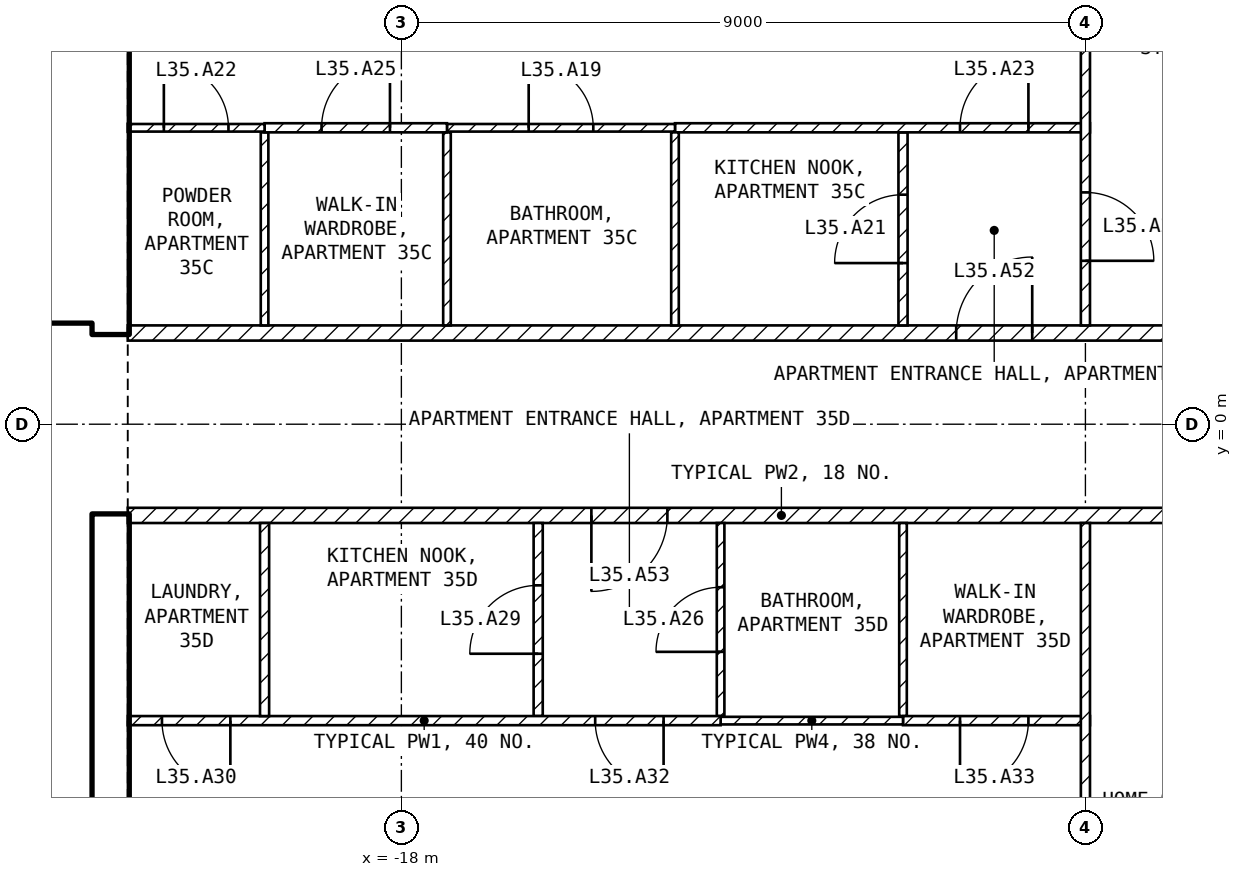
"""IFC4 building model, lengths in metres.
Left out: names, types, materials, properties, quantities, classifications, styles, units other than length and angle.
Written with IfcOpenShell. Run it as: python <this file> out.ifc"""

import sys

from ifc_helpers import new_model, si_unit, direction, frame, frame_2d, origin, place, context, subcontext, project, spatial, rectangle, extrude, element, fill, save


model = new_model("IFC4")
c1 = context("Model", 3, precision=1e-05, world=origin(), true_north=direction((0.0, 1.0)))
c2 = subcontext(c1, "Body", "Model", "MODEL_VIEW")
j1 = project(units=[si_unit("LENGTHUNIT", "METRE"), si_unit("PLANEANGLEUNIT", "RADIAN")], contexts=[c1])
p1 = place(None, origin())
s1 = spatial("IfcSite", under=j1, at=p1, CompositionType="ELEMENT")
p2 = place(p1, origin())
s2 = spatial("IfcBuilding", under=s1, at=p2, CompositionType="ELEMENT")
p3 = place(p2, frame((0.0, 0.0, 144.4)))
s3 = spatial("IfcBuildingStorey", under=s2, at=p3, CompositionType="ELEMENT", Elevation=144.4)
for number, where, z_axis, x_axis in (
    (1, (-21.825, -8.1, 0.0), (0.0, 0.0, 1.0), (0.0, 1.0, 0.0)),
    (2, (-21.825, 1.2, 0.0), (0.0, 0.0, 1.0), (0.0, 1.0, 0.0)),
):
    element("IfcWall", number, at=place(p3, frame(where, z_axis=z_axis, x_axis=x_axis)), inside=s3, PredefinedType="SHEAR", context=c2, shape_type="SweptSolid", body=[
        extrude(rectangle(XDim=6.9, YDim=0.45, at=frame_2d((3.45, 0.0))), origin(), (0.0, 0.0, 1.0), 3.25),
    ])
p4 = place(p3, frame((-33.05, 1.45, 0.0), z_axis=(0.0, 0.0, 1.0), x_axis=(1.0, 0.0, 0.0)))
e3 = element("IfcWall", 3, at=p4, inside=s3, PredefinedType="SOLIDWALL", context=c2, shape_type="SweptSolid", body=[
    extrude(rectangle(XDim=11.0, YDim=0.2, at=frame_2d((5.5, 0.0))), origin(), (0.0, 0.0, 1.0), 3.25),
])
p5 = place(p4, frame((9.25, 0.0, 0.0)))
e4 = element("IfcOpeningElement", 4, at=p5, cuts=e3, PredefinedType="OPENING", context=c2, shape_type="SweptSolid", body=[
    extrude(rectangle(XDim=1.0, YDim=2.1, at=frame_2d((0.5, 1.05))), frame((0.0, 0.11, 0.0), z_axis=(0.0, -1.0, 0.0), x_axis=(1.0, 0.0, 0.0)), (0.0, 0.0, 1.0), 0.22),
])
p6 = place(p4, frame((6.75, 0.0, 0.0)))
e5 = element("IfcOpeningElement", 5, at=p6, cuts=e3, PredefinedType="OPENING", context=c2, shape_type="SweptSolid", body=[
    extrude(rectangle(XDim=1.0, YDim=2.1, at=frame_2d((0.5, 1.05))), frame((0.0, 0.11, 0.0), z_axis=(0.0, -1.0, 0.0), x_axis=(1.0, 0.0, 0.0)), (0.0, 0.0, 1.0), 0.22),
])
p7 = place(p4, frame((1.025, 0.0, 0.0)))
e6 = element("IfcOpeningElement", 6, at=p7, cuts=e3, PredefinedType="OPENING", context=c2, shape_type="SweptSolid", body=[
    extrude(rectangle(XDim=0.9, YDim=2.1, at=frame_2d((0.45, 1.05))), frame((0.0, 0.11, 0.0), z_axis=(0.0, -1.0, 0.0), x_axis=(1.0, 0.0, 0.0)), (0.0, 0.0, 1.0), 0.22),
])
p8 = place(p3, frame((-21.6, 1.2, 0.0), z_axis=(0.0, 0.0, 1.0), x_axis=(1.0, 0.0, 0.0)))
e7 = element("IfcWall", 7, at=p8, inside=s3, PredefinedType="PARTITIONING", context=c2, shape_type="SweptSolid", body=[
    extrude(rectangle(XDim=17.2, YDim=0.2, at=frame_2d((8.6, 0.0))), origin(), (0.0, 0.0, 1.0), 3.25),
])
p9 = place(p8, frame((10.9, 0.0, 0.0)))
e8 = element("IfcOpeningElement", 8, at=p9, cuts=e7, PredefinedType="OPENING", context=c2, shape_type="SweptSolid", body=[
    extrude(rectangle(XDim=1.0, YDim=2.1, at=frame_2d((0.5, 1.05))), frame((0.0, 0.11, 0.0), z_axis=(0.0, -1.0, 0.0), x_axis=(1.0, 0.0, 0.0)), (0.0, 0.0, 1.0), 0.22),
])
p10 = place(p3, frame((-4.4, -1.2, 0.0), z_axis=(0.0, 0.0, 1.0), x_axis=(-1.0, 0.0, 0.0)))
e9 = element("IfcWall", 9, at=p10, inside=s3, PredefinedType="PARTITIONING", context=c2, shape_type="SweptSolid", body=[
    extrude(rectangle(XDim=17.2, YDim=0.2, at=frame_2d((8.6, 0.0))), origin(), (0.0, 0.0, 1.0), 3.25),
])
p11 = place(p10, frame((10.1, 0.0, 0.0)))
e10 = element("IfcOpeningElement", 10, at=p11, cuts=e9, PredefinedType="OPENING", context=c2, shape_type="SweptSolid", body=[
    extrude(rectangle(XDim=1.0, YDim=2.1, at=frame_2d((0.5, 1.05))), frame((0.0, 0.11, 0.0), z_axis=(0.0, -1.0, 0.0), x_axis=(1.0, 0.0, 0.0)), (0.0, 0.0, 1.0), 0.22),
])
p12 = place(p3, frame((-11.4, 1.3, 0.0), z_axis=(0.0, 0.0, 1.0), x_axis=(0.0, 1.0, 0.0)))
e11 = element("IfcWall", 11, at=p12, inside=s3, PredefinedType="PARTITIONING", context=c2, shape_type="SweptSolid", body=[
    extrude(rectangle(XDim=2.54, YDim=0.12, at=frame_2d((1.27, 0.0))), origin(), (0.0, 0.0, 1.0), 3.25),
])
p13 = place(p12, frame((0.82, 0.0, 0.0)))
e12 = element("IfcOpeningElement", 12, at=p13, cuts=e11, PredefinedType="OPENING", context=c2, shape_type="SweptSolid", body=[
    extrude(rectangle(XDim=0.9, YDim=2.1, at=frame_2d((0.45, 1.05))), frame((0.0, 0.07, 0.0), z_axis=(0.0, -1.0, 0.0), x_axis=(1.0, 0.0, 0.0)), (0.0, 0.0, 1.0), 0.14),
])
p14 = place(p3, frame((-14.4, 3.9, 0.0), z_axis=(0.0, 0.0, 1.0), x_axis=(1.0, 0.0, 0.0)))
e13 = element("IfcWall", 13, at=p14, inside=s3, PredefinedType="PARTITIONING", context=c2, shape_type="SweptSolid", body=[
    extrude(rectangle(XDim=5.46, YDim=0.12, at=frame_2d((2.73, 0.0))), origin(), (0.0, 0.0, 1.0), 3.25),
])
p15 = place(p14, frame((3.75, 0.0, 0.0)))
e14 = element("IfcOpeningElement", 14, at=p15, cuts=e13, PredefinedType="OPENING", context=c2, shape_type="SweptSolid", body=[
    extrude(rectangle(XDim=0.9, YDim=2.1, at=frame_2d((0.45, 1.05))), frame((0.0, 0.07, 0.0), z_axis=(0.0, -1.0, 0.0), x_axis=(1.0, 0.0, 0.0)), (0.0, 0.0, 1.0), 0.14),
])
p16 = place(p3, frame((-9.0, 8.92, 0.0), z_axis=(0.0, 0.0, 1.0), x_axis=(0.0, -1.0, 0.0)))
e15 = element("IfcWall", 15, at=p16, inside=s3, PredefinedType="PARTITIONING", context=c2, shape_type="SweptSolid", body=[
    extrude(rectangle(XDim=7.62, YDim=0.12, at=frame_2d((3.81, 0.0))), origin(), (0.0, 0.0, 1.0), 3.25),
])
p17 = place(p16, frame((5.87, 0.0, 0.0)))
e16 = element("IfcOpeningElement", 16, at=p17, cuts=e15, PredefinedType="OPENING", context=c2, shape_type="SweptSolid", body=[
    extrude(rectangle(XDim=0.9, YDim=2.1, at=frame_2d((0.45, 1.05))), frame((0.0, 0.07, 0.0), z_axis=(0.0, -1.0, 0.0), x_axis=(1.0, 0.0, 0.0)), (0.0, 0.0, 1.0), 0.14),
])
for number, where, z_axis, x_axis in (
    (17, (-14.4, 1.3, 0.0), (0.0, 0.0, 1.0), (0.0, 1.0, 0.0)),
    (18, (-17.4, 1.3, 0.0), (0.0, 0.0, 1.0), (0.0, 1.0, 0.0)),
):
    element("IfcWall", number, at=place(p3, frame(where, z_axis=z_axis, x_axis=x_axis)), inside=s3, PredefinedType="PARTITIONING", context=c2, shape_type="SweptSolid", body=[
        extrude(rectangle(XDim=2.54, YDim=0.1, at=frame_2d((1.27, 0.0))), origin(), (0.0, 0.0, 1.0), 3.25),
    ])
p18 = place(p3, frame((-17.4, 3.9, 0.0), z_axis=(0.0, 0.0, 1.0), x_axis=(1.0, 0.0, 0.0)))
e19 = element("IfcWall", 19, at=p18, inside=s3, PredefinedType="PARTITIONING", context=c2, shape_type="SweptSolid", body=[
    extrude(rectangle(XDim=3.0, YDim=0.1, at=frame_2d((1.5, 0.0))), origin(), (0.0, 0.0, 1.0), 3.25),
])
p19 = place(p18, frame((1.075, 0.0, 0.0)))
e20 = element("IfcOpeningElement", 20, at=p19, cuts=e19, PredefinedType="OPENING", context=c2, shape_type="SweptSolid", body=[
    extrude(rectangle(XDim=0.85, YDim=2.1, at=frame_2d((0.425, 1.05))), frame((0.0, 0.06, 0.0), z_axis=(0.0, -1.0, 0.0), x_axis=(1.0, 0.0, 0.0)), (0.0, 0.0, 1.0), 0.12),
])
p20 = place(p3, frame((-19.8, 1.3, 0.0), z_axis=(0.0, 0.0, 1.0), x_axis=(0.0, 1.0, 0.0)))
e21 = element("IfcWall", 21, at=p20, inside=s3, PredefinedType="PARTITIONING", context=c2, shape_type="SweptSolid", body=[
    extrude(rectangle(XDim=2.54, YDim=0.1, at=frame_2d((1.27, 0.0))), origin(), (0.0, 0.0, 1.0), 3.25),
])
p21 = place(p3, frame((-19.8, 3.9, 0.0), z_axis=(0.0, 0.0, 1.0), x_axis=(1.0, 0.0, 0.0)))
e22 = element("IfcWall", 22, at=p21, inside=s3, PredefinedType="PARTITIONING", context=c2, shape_type="SweptSolid", body=[
    extrude(rectangle(XDim=2.4, YDim=0.12, at=frame_2d((1.2, 0.0))), origin(), (0.0, 0.0, 1.0), 3.25),
])
p22 = place(p21, frame((0.75, 0.0, 0.0)))
e23 = element("IfcOpeningElement", 23, at=p22, cuts=e22, PredefinedType="OPENING", context=c2, shape_type="SweptSolid", body=[
    extrude(rectangle(XDim=0.9, YDim=2.1, at=frame_2d((0.45, 1.05))), frame((0.0, 0.07, 0.0), z_axis=(0.0, -1.0, 0.0), x_axis=(1.0, 0.0, 0.0)), (0.0, 0.0, 1.0), 0.14),
])
p23 = place(p3, frame((-21.6, 3.9, 0.0), z_axis=(0.0, 0.0, 1.0), x_axis=(1.0, 0.0, 0.0)))
e24 = element("IfcWall", 24, at=p23, inside=s3, PredefinedType="PARTITIONING", context=c2, shape_type="SweptSolid", body=[
    extrude(rectangle(XDim=1.8, YDim=0.1, at=frame_2d((0.9, 0.0))), origin(), (0.0, 0.0, 1.0), 3.25),
])
p24 = place(p23, frame((0.475, 0.0, 0.0)))
e25 = element("IfcOpeningElement", 25, at=p24, cuts=e24, PredefinedType="OPENING", context=c2, shape_type="SweptSolid", body=[
    extrude(rectangle(XDim=0.85, YDim=2.1, at=frame_2d((0.425, 1.05))), frame((0.0, 0.06, 0.0), z_axis=(0.0, -1.0, 0.0), x_axis=(1.0, 0.0, 0.0)), (0.0, 0.0, 1.0), 0.12),
])
p25 = place(p3, frame((-11.4, -3.84, 0.0), z_axis=(0.0, 0.0, 1.0), x_axis=(0.0, 1.0, 0.0)))
e26 = element("IfcWall", 26, at=p25, inside=s3, PredefinedType="PARTITIONING", context=c2, shape_type="SweptSolid", body=[
    extrude(rectangle(XDim=2.54, YDim=0.1, at=frame_2d((1.27, 0.0))), origin(), (0.0, 0.0, 1.0), 3.25),
])
p26 = place(p3, frame((-8.94, -3.9, 0.0), z_axis=(0.0, 0.0, 1.0), x_axis=(-1.0, 0.0, 0.0)))
e27 = element("IfcWall", 27, at=p26, inside=s3, PredefinedType="PARTITIONING", context=c2, shape_type="SweptSolid", body=[
    extrude(rectangle(XDim=2.46, YDim=0.12, at=frame_2d((1.23, 0.0))), origin(), (0.0, 0.0, 1.0), 3.25),
])
p27 = place(p26, frame((0.81, 0.0, 0.0)))
e28 = element("IfcOpeningElement", 28, at=p27, cuts=e27, PredefinedType="OPENING", context=c2, shape_type="SweptSolid", body=[
    extrude(rectangle(XDim=0.9, YDim=2.1, at=frame_2d((0.45, 1.05))), frame((0.0, 0.07, 0.0), z_axis=(0.0, -1.0, 0.0), x_axis=(1.0, 0.0, 0.0)), (0.0, 0.0, 1.0), 0.14),
])
p28 = place(p3, frame((-9.0, -1.3, 0.0), z_axis=(0.0, 0.0, 1.0), x_axis=(0.0, -1.0, 0.0)))
e29 = element("IfcWall", 29, at=p28, inside=s3, PredefinedType="PARTITIONING", context=c2, shape_type="SweptSolid", body=[
    extrude(rectangle(XDim=7.62, YDim=0.12, at=frame_2d((3.81, 0.0))), origin(), (0.0, 0.0, 1.0), 3.25),
])
p29 = place(p28, frame((4.2, 0.0, 0.0)))
e30 = element("IfcOpeningElement", 30, at=p29, cuts=e29, PredefinedType="OPENING", context=c2, shape_type="SweptSolid", body=[
    extrude(rectangle(XDim=0.9, YDim=2.1, at=frame_2d((0.45, 1.05))), frame((0.0, 0.07, 0.0), z_axis=(0.0, -1.0, 0.0), x_axis=(1.0, 0.0, 0.0)), (0.0, 0.0, 1.0), 0.14),
])
p30 = place(p3, frame((-13.8, -3.84, 0.0), z_axis=(0.0, 0.0, 1.0), x_axis=(0.0, 1.0, 0.0)))
e31 = element("IfcWall", 31, at=p30, inside=s3, PredefinedType="PARTITIONING", context=c2, shape_type="SweptSolid", body=[
    extrude(rectangle(XDim=2.54, YDim=0.1, at=frame_2d((1.27, 0.0))), origin(), (0.0, 0.0, 1.0), 3.25),
])
p31 = place(p30, frame((0.845, 0.0, 0.0)))
e32 = element("IfcOpeningElement", 32, at=p31, cuts=e31, PredefinedType="OPENING", context=c2, shape_type="SweptSolid", body=[
    extrude(rectangle(XDim=0.85, YDim=2.1, at=frame_2d((0.425, 1.05))), frame((0.0, 0.06, 0.0), z_axis=(0.0, -1.0, 0.0), x_axis=(1.0, 0.0, 0.0)), (0.0, 0.0, 1.0), 0.12),
])
p32 = place(p3, frame((-11.4, -3.9, 0.0), z_axis=(0.0, 0.0, 1.0), x_axis=(-1.0, 0.0, 0.0)))
e33 = element("IfcWall", 33, at=p32, inside=s3, PredefinedType="PARTITIONING", context=c2, shape_type="SweptSolid", body=[
    extrude(rectangle(XDim=2.4, YDim=0.1, at=frame_2d((1.2, 0.0))), origin(), (0.0, 0.0, 1.0), 3.25),
])
p33 = place(p3, frame((-16.2, -3.84, 0.0), z_axis=(0.0, 0.0, 1.0), x_axis=(0.0, 1.0, 0.0)))
e34 = element("IfcWall", 34, at=p33, inside=s3, PredefinedType="PARTITIONING", context=c2, shape_type="SweptSolid", body=[
    extrude(rectangle(XDim=2.54, YDim=0.12, at=frame_2d((1.27, 0.0))), origin(), (0.0, 0.0, 1.0), 3.25),
])
p34 = place(p33, frame((0.82, 0.0, 0.0)))
e35 = element("IfcOpeningElement", 35, at=p34, cuts=e34, PredefinedType="OPENING", context=c2, shape_type="SweptSolid", body=[
    extrude(rectangle(XDim=0.9, YDim=2.1, at=frame_2d((0.45, 1.05))), frame((0.0, 0.07, 0.0), z_axis=(0.0, -1.0, 0.0), x_axis=(1.0, 0.0, 0.0)), (0.0, 0.0, 1.0), 0.14),
])
p35 = place(p3, frame((-13.8, -3.9, 0.0), z_axis=(0.0, 0.0, 1.0), x_axis=(-1.0, 0.0, 0.0)))
e36 = element("IfcWall", 36, at=p35, inside=s3, PredefinedType="PARTITIONING", context=c2, shape_type="SweptSolid", body=[
    extrude(rectangle(XDim=7.8, YDim=0.12, at=frame_2d((3.9, 0.0))), origin(), (0.0, 0.0, 1.0), 3.25),
])
p36 = place(p35, frame((6.45, 0.0, 0.0)))
e37 = element("IfcOpeningElement", 37, at=p36, cuts=e36, PredefinedType="OPENING", context=c2, shape_type="SweptSolid", body=[
    extrude(rectangle(XDim=0.9, YDim=2.1, at=frame_2d((0.45, 1.05))), frame((0.0, 0.07, 0.0), z_axis=(0.0, -1.0, 0.0), x_axis=(1.0, 0.0, 0.0)), (0.0, 0.0, 1.0), 0.14),
])
p37 = place(p35, frame((0.75, 0.0, 0.0)))
e38 = element("IfcOpeningElement", 38, at=p37, cuts=e36, PredefinedType="OPENING", context=c2, shape_type="SweptSolid", body=[
    extrude(rectangle(XDim=0.9, YDim=2.1, at=frame_2d((0.45, 1.05))), frame((0.0, 0.07, 0.0), z_axis=(0.0, -1.0, 0.0), x_axis=(1.0, 0.0, 0.0)), (0.0, 0.0, 1.0), 0.14),
])
p38 = place(p3, frame((-19.8, -3.84, 0.0), z_axis=(0.0, 0.0, 1.0), x_axis=(0.0, 1.0, 0.0)))
e39 = element("IfcWall", 39, at=p38, inside=s3, PredefinedType="PARTITIONING", context=c2, shape_type="SweptSolid", body=[
    extrude(rectangle(XDim=2.54, YDim=0.12, at=frame_2d((1.27, 0.0))), origin(), (0.0, 0.0, 1.0), 3.25),
])
p39 = place(p19, origin())
e40 = element("IfcDoor", 40, at=p39, inside=s3, OperationType="SINGLE_SWING_LEFT", PredefinedType="DOOR", context=c2, shape_type="SweptSolid", body=[
    extrude(rectangle(XDim=0.85, YDim=2.1, at=frame_2d((0.425, 1.05))), frame((0.0, 0.025, 0.0), z_axis=(0.0, -1.0, 0.0), x_axis=(1.0, 0.0, 0.0)), (0.0, 0.0, 1.0), 0.05),
])
fill(e20, e40)
p40 = place(p13, origin())
e41 = element("IfcDoor", 41, at=p40, inside=s3, OperationType="SINGLE_SWING_LEFT", PredefinedType="DOOR", context=c2, shape_type="SweptSolid", body=[
    extrude(rectangle(XDim=0.9, YDim=2.1, at=frame_2d((0.45, 1.05))), frame((0.0, 0.025, 0.0), z_axis=(0.0, -1.0, 0.0), x_axis=(1.0, 0.0, 0.0)), (0.0, 0.0, 1.0), 0.05),
])
fill(e12, e41)
p41 = place(p24, origin())
e42 = element("IfcDoor", 42, at=p41, inside=s3, OperationType="SINGLE_SWING_LEFT", PredefinedType="DOOR", context=c2, shape_type="SweptSolid", body=[
    extrude(rectangle(XDim=0.85, YDim=2.1, at=frame_2d((0.425, 1.05))), frame((0.0, 0.025, 0.0), z_axis=(0.0, -1.0, 0.0), x_axis=(1.0, 0.0, 0.0)), (0.0, 0.0, 1.0), 0.05),
])
fill(e25, e42)
p42 = place(p15, origin())
e43 = element("IfcDoor", 43, at=p42, inside=s3, OperationType="SINGLE_SWING_RIGHT", PredefinedType="DOOR", context=c2, shape_type="SweptSolid", body=[
    extrude(rectangle(XDim=0.9, YDim=2.1, at=frame_2d((0.45, 1.05))), frame((0.0, 0.025, 0.0), z_axis=(0.0, -1.0, 0.0), x_axis=(1.0, 0.0, 0.0)), (0.0, 0.0, 1.0), 0.05),
])
fill(e14, e43)
p43 = place(p17, origin())
e44 = element("IfcDoor", 44, at=p43, inside=s3, OperationType="SINGLE_SWING_RIGHT", PredefinedType="DOOR", context=c2, shape_type="SweptSolid", body=[
    extrude(rectangle(XDim=0.9, YDim=2.1, at=frame_2d((0.45, 1.05))), frame((0.0, 0.025, 0.0), z_axis=(0.0, -1.0, 0.0), x_axis=(1.0, 0.0, 0.0)), (0.0, 0.0, 1.0), 0.05),
])
fill(e16, e44)
p44 = place(p22, origin())
e45 = element("IfcDoor", 45, at=p44, inside=s3, OperationType="SINGLE_SWING_RIGHT", PredefinedType="DOOR", context=c2, shape_type="SweptSolid", body=[
    extrude(rectangle(XDim=0.9, YDim=2.1, at=frame_2d((0.45, 1.05))), frame((0.0, 0.025, 0.0), z_axis=(0.0, -1.0, 0.0), x_axis=(1.0, 0.0, 0.0)), (0.0, 0.0, 1.0), 0.05),
])
fill(e23, e45)
p45 = place(p31, origin())
e46 = element("IfcDoor", 46, at=p45, inside=s3, OperationType="SINGLE_SWING_LEFT", PredefinedType="DOOR", context=c2, shape_type="SweptSolid", body=[
    extrude(rectangle(XDim=0.85, YDim=2.1, at=frame_2d((0.425, 1.05))), frame((0.0, 0.025, 0.0), z_axis=(0.0, -1.0, 0.0), x_axis=(1.0, 0.0, 0.0)), (0.0, 0.0, 1.0), 0.05),
])
fill(e32, e46)
p46 = place(p34, origin())
e47 = element("IfcDoor", 47, at=p46, inside=s3, OperationType="SINGLE_SWING_LEFT", PredefinedType="DOOR", context=c2, shape_type="SweptSolid", body=[
    extrude(rectangle(XDim=0.9, YDim=2.1, at=frame_2d((0.45, 1.05))), frame((0.0, 0.025, 0.0), z_axis=(0.0, -1.0, 0.0), x_axis=(1.0, 0.0, 0.0)), (0.0, 0.0, 1.0), 0.05),
])
fill(e35, e47)
p47 = place(p36, origin())
e48 = element("IfcDoor", 48, at=p47, inside=s3, OperationType="SINGLE_SWING_LEFT", PredefinedType="DOOR", context=c2, shape_type="SweptSolid", body=[
    extrude(rectangle(XDim=0.9, YDim=2.1, at=frame_2d((0.45, 1.05))), frame((0.0, 0.025, 0.0), z_axis=(0.0, -1.0, 0.0), x_axis=(1.0, 0.0, 0.0)), (0.0, 0.0, 1.0), 0.05),
])
fill(e37, e48)
p48 = place(p37, origin())
e49 = element("IfcDoor", 49, at=p48, inside=s3, OperationType="SINGLE_SWING_LEFT", PredefinedType="DOOR", context=c2, shape_type="SweptSolid", body=[
    extrude(rectangle(XDim=0.9, YDim=2.1, at=frame_2d((0.45, 1.05))), frame((0.0, 0.025, 0.0), z_axis=(0.0, -1.0, 0.0), x_axis=(1.0, 0.0, 0.0)), (0.0, 0.0, 1.0), 0.05),
])
fill(e38, e49)
p49 = place(p27, origin())
e50 = element("IfcDoor", 50, at=p49, inside=s3, OperationType="SINGLE_SWING_RIGHT", PredefinedType="DOOR", context=c2, shape_type="SweptSolid", body=[
    extrude(rectangle(XDim=0.9, YDim=2.1, at=frame_2d((0.45, 1.05))), frame((0.0, 0.025, 0.0), z_axis=(0.0, -1.0, 0.0), x_axis=(1.0, 0.0, 0.0)), (0.0, 0.0, 1.0), 0.05),
])
fill(e28, e50)
p50 = place(p9, origin())
e51 = element("IfcDoor", 51, at=p50, inside=s3, OperationType="SINGLE_SWING_RIGHT", PredefinedType="DOOR", context=c2, shape_type="SweptSolid", body=[
    extrude(rectangle(XDim=1.0, YDim=2.1, at=frame_2d((0.5, 1.05))), frame((0.0, 0.025, 0.0), z_axis=(0.0, -1.0, 0.0), x_axis=(1.0, 0.0, 0.0)), (0.0, 0.0, 1.0), 0.05),
])
fill(e8, e51)
p51 = place(p11, origin())
e52 = element("IfcDoor", 52, at=p51, inside=s3, OperationType="SINGLE_SWING_RIGHT", PredefinedType="DOOR", context=c2, shape_type="SweptSolid", body=[
    extrude(rectangle(XDim=1.0, YDim=2.1, at=frame_2d((0.5, 1.05))), frame((0.0, 0.025, 0.0), z_axis=(0.0, -1.0, 0.0), x_axis=(1.0, 0.0, 0.0)), (0.0, 0.0, 1.0), 0.05),
])
fill(e10, e52)
save(model, sys.argv[1])
